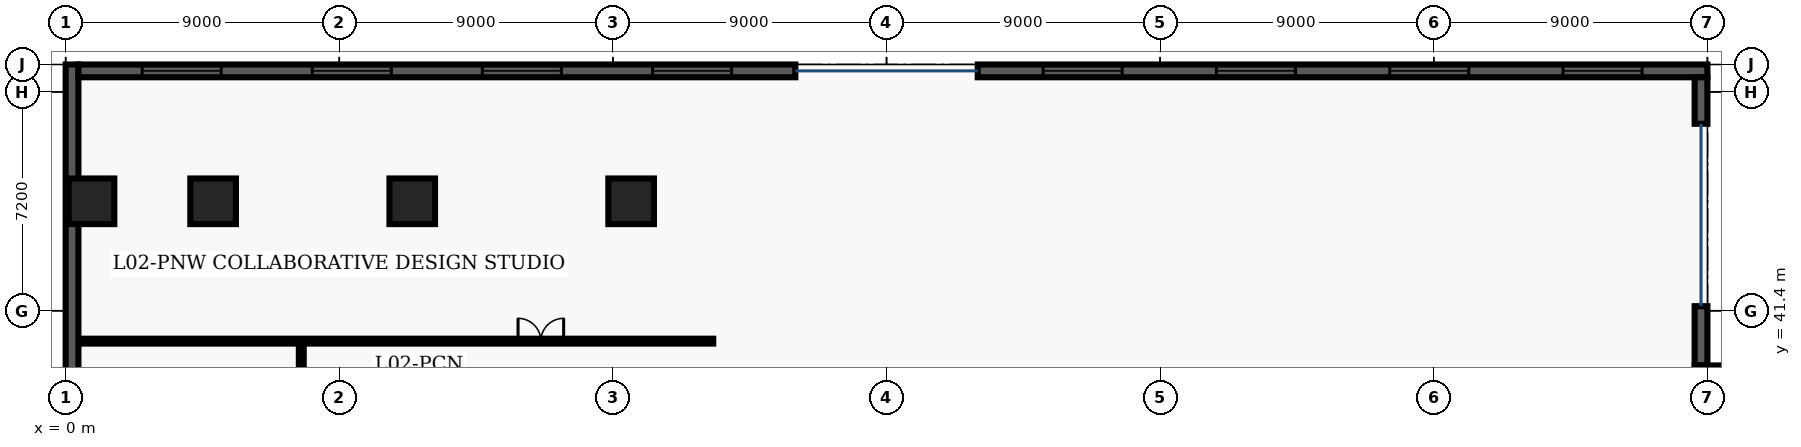
"""IFC4 building model, lengths in metres.
Left out: names, types, materials, properties, quantities, classifications, styles, units other than length and angle.
Written with IfcOpenShell. Run it as: python <this file> out.ifc"""

import sys

from ifc_helpers import new_model, entity, si_unit, converted_unit, direction, frame, origin_with_axes, origin_2d_with_axis, place, context, subcontext, project, spatial, polyline, rectangle, outline, extrude, element, fill, save


model = new_model("IFC4")
c1 = context("Model", 3, precision=1e-05, world=origin_with_axes(), true_north=direction((0.0, 1.0)))
c2 = subcontext(c1, "Body", "Model", "MODEL_VIEW")
j1 = project(units=[si_unit("LENGTHUNIT", "METRE"), converted_unit("PLANEANGLEUNIT", "DEGREE", entity("IfcPlaneAngleMeasure", 0.017), si_unit("PLANEANGLEUNIT", "RADIAN"), dimensions=[0, 0, 0, 0, 0, 0, 0])], contexts=[c1])
p1 = place(None, origin_with_axes())
s1 = spatial("IfcSite", under=j1, at=p1, CompositionType="ELEMENT")
p2 = place(p1, origin_with_axes())
s2 = spatial("IfcBuilding", under=s1, at=p2, CompositionType="ELEMENT")
p3 = place(p2, frame((0.0, 0.0, 10.8), z_axis=(0.0, 0.0, 1.0), x_axis=(1.0, 0.0, 0.0)))
s3 = spatial("IfcBuildingStorey", under=s2, at=p3, CompositionType="ELEMENT", Elevation=10.8)
for number, where, z_axis, x_axis in (
    (1, (11.4, 45.0, 0.0), (0.0, 0.0, 1.0), (1.0, 0.0, 0.0)),
    (2, (18.6, 45.0, 0.0), (0.0, 0.0, 1.0), (1.0, 0.0, 0.0)),
    (3, (4.85, 45.0, 0.0), (0.0, 0.0, 1.0), (1.0, 0.0, 0.0)),
    (4, (0.85, 45.0, 0.0), (0.0, 0.0, 1.0), (1.0, 0.0, 0.0)),
):
    element("IfcColumn", number, at=place(p3, frame(where, z_axis=z_axis, x_axis=x_axis)), inside=s3, PredefinedType="COLUMN", context=c2, shape_type="SweptSolid", body=[
        extrude(rectangle(XDim=1.5, YDim=1.5, at=origin_2d_with_axis()), origin_with_axes(), (0.0, 0.0, 1.0), 4.5),
    ])
p4 = place(p3, frame((0.38, 40.4, 0.0), z_axis=(0.0, 0.0, 1.0), x_axis=(1.0, 0.0, 0.0)))
e5 = element("IfcWall", 5, at=p4, inside=s3, PredefinedType="PARTITIONING", context=c2, shape_type="SweptSolid", body=[
    extrude(outline(polyline([(0.0, -0.08), (20.92, -0.08), (20.92, 0.08), (0.0, 0.08), (0.0, -0.08)])), origin_with_axes(), (0.0, 0.0, 1.0), 3.2),
])
p5 = place(p4, frame((15.25, 0.0, 0.0), z_axis=(0.0, 0.0, 1.0), x_axis=(1.0, 0.0, 0.0)))
e6 = element("IfcOpeningElement", 6, at=p5, cuts=e5, PredefinedType="OPENING", context=c2, shape_type="SweptSolid", body=[
    extrude(rectangle(XDim=1.5, YDim=0.18, at=origin_2d_with_axis()), origin_with_axes(), (0.0, 0.0, 1.0), 2.2),
])
p6 = place(p3, frame((7.75, 7.8, 0.0), z_axis=(0.0, 0.0, 1.0), x_axis=(0.0, 1.0, 0.0)))
e7 = element("IfcWall", 7, at=p6, inside=s3, PredefinedType="PARTITIONING", context=c2, shape_type="SweptSolid", body=[
    extrude(outline(polyline([(0.0, -0.08), (32.6, -0.08), (32.6, 0.08), (0.0, 0.08), (0.0, -0.08)])), origin_with_axes(), (0.0, 0.0, 1.0), 3.2),
])
p7 = place(p6, frame((8.25, 0.0, 0.0), z_axis=(0.0, 0.0, 1.0), x_axis=(1.0, 0.0, 0.0)))
e8 = element("IfcOpeningElement", 8, at=p7, cuts=e7, PredefinedType="OPENING", context=c2, shape_type="SweptSolid", body=[
    extrude(rectangle(XDim=1.5, YDim=0.18, at=origin_2d_with_axis()), origin_with_axes(), (0.0, 0.0, 1.0), 2.2),
])
p8 = place(p6, frame((21.5, 0.0, 0.0), z_axis=(0.0, 0.0, 1.0), x_axis=(1.0, 0.0, 0.0)))
e9 = element("IfcOpeningElement", 9, at=p8, cuts=e7, PredefinedType="OPENING", context=c2, shape_type="SweptSolid", body=[
    extrude(rectangle(XDim=1.0, YDim=0.18, at=origin_2d_with_axis()), origin_with_axes(), (0.0, 0.0, 1.0), 2.15),
])
p9 = place(p3, frame((0.21, 0.42, 0.0), z_axis=(0.0, 0.0, 1.0), x_axis=(0.0, 1.0, 0.0)))
e10 = element("IfcWall", 10, at=p9, inside=s3, PredefinedType="SOLIDWALL", context=c2, shape_type="SweptSolid", body=[
    extrude(outline(polyline([(0.0, -0.21), (49.08, -0.21), (49.08, 0.21), (0.0, 0.21), (0.0, -0.21)])), origin_with_axes(), (0.0, 0.0, 1.0), 4.26),
])
p10 = place(p9, frame((13.9, 0.0, 0.45), z_axis=(0.0, 0.0, 1.0), x_axis=(1.0, 0.0, 0.0)))
e11 = element("IfcOpeningElement", 11, at=p10, cuts=e10, PredefinedType="OPENING", context=c2, shape_type="SweptSolid", body=[
    extrude(rectangle(XDim=2.6, YDim=0.44, at=origin_2d_with_axis()), origin_with_axes(), (0.0, 0.0, 1.0), 2.8),
])
p11 = place(p9, frame((20.07, 0.0, 0.45), z_axis=(0.0, 0.0, 1.0), x_axis=(1.0, 0.0, 0.0)))
e12 = element("IfcOpeningElement", 12, at=p11, cuts=e10, PredefinedType="OPENING", context=c2, shape_type="SweptSolid", body=[
    extrude(rectangle(XDim=2.6, YDim=0.44, at=origin_2d_with_axis()), origin_with_axes(), (0.0, 0.0, 1.0), 2.8),
])
p12 = place(p9, frame((24.54, 0.0, 0.45), z_axis=(0.0, 0.0, 1.0), x_axis=(1.0, 0.0, 0.0)))
e13 = element("IfcOpeningElement", 13, at=p12, cuts=e10, PredefinedType="OPENING", context=c2, shape_type="SweptSolid", body=[
    extrude(rectangle(XDim=2.6, YDim=0.44, at=origin_2d_with_axis()), origin_with_axes(), (0.0, 0.0, 1.0), 2.8),
])
p13 = place(p9, frame((34.73, 0.0, 0.45), z_axis=(0.0, 0.0, 1.0), x_axis=(1.0, 0.0, 0.0)))
e14 = element("IfcOpeningElement", 14, at=p13, cuts=e10, PredefinedType="OPENING", context=c2, shape_type="SweptSolid", body=[
    extrude(rectangle(XDim=2.6, YDim=0.44, at=origin_2d_with_axis()), origin_with_axes(), (0.0, 0.0, 1.0), 2.8),
])
p14 = place(p3, frame((0.42, 49.29, 0.0), z_axis=(0.0, 0.0, 1.0), x_axis=(1.0, 0.0, 0.0)))
e15 = element("IfcWall", 15, at=p14, inside=s3, PredefinedType="SOLIDWALL", context=c2, shape_type="SweptSolid", body=[
    extrude(outline(polyline([(0.0, -0.21), (23.58, -0.21), (23.58, 0.21), (0.0, 0.21), (0.0, -0.21)])), origin_with_axes(), (0.0, 0.0, 1.0), 4.26),
])
p15 = place(p14, frame((3.398, 0.0, 0.45), z_axis=(0.0, 0.0, 1.0), x_axis=(1.0, 0.0, 0.0)))
e16 = element("IfcOpeningElement", 16, at=p15, cuts=e15, PredefinedType="OPENING", context=c2, shape_type="SweptSolid", body=[
    extrude(rectangle(XDim=2.6, YDim=0.44, at=origin_2d_with_axis()), origin_with_axes(), (0.0, 0.0, 1.0), 2.8),
])
p16 = place(p14, frame((8.992, 0.0, 0.45), z_axis=(0.0, 0.0, 1.0), x_axis=(1.0, 0.0, 0.0)))
e17 = element("IfcOpeningElement", 17, at=p16, cuts=e15, PredefinedType="OPENING", context=c2, shape_type="SweptSolid", body=[
    extrude(rectangle(XDim=2.6, YDim=0.44, at=origin_2d_with_axis()), origin_with_axes(), (0.0, 0.0, 1.0), 2.8),
])
p17 = place(p14, frame((14.587, 0.0, 0.45), z_axis=(0.0, 0.0, 1.0), x_axis=(1.0, 0.0, 0.0)))
e18 = element("IfcOpeningElement", 18, at=p17, cuts=e15, PredefinedType="OPENING", context=c2, shape_type="SweptSolid", body=[
    extrude(rectangle(XDim=2.6, YDim=0.44, at=origin_2d_with_axis()), origin_with_axes(), (0.0, 0.0, 1.0), 2.8),
])
p18 = place(p14, frame((20.183, 0.0, 0.45), z_axis=(0.0, 0.0, 1.0), x_axis=(1.0, 0.0, 0.0)))
e19 = element("IfcOpeningElement", 19, at=p18, cuts=e15, PredefinedType="OPENING", context=c2, shape_type="SweptSolid", body=[
    extrude(rectangle(XDim=2.6, YDim=0.44, at=origin_2d_with_axis()), origin_with_axes(), (0.0, 0.0, 1.0), 2.8),
])
p19 = place(p3, frame((30.0, 49.29, 0.0), z_axis=(0.0, 0.0, 1.0), x_axis=(1.0, 0.0, 0.0)))
e20 = element("IfcWall", 20, at=p19, inside=s3, PredefinedType="SOLIDWALL", context=c2, shape_type="SweptSolid", body=[
    extrude(outline(polyline([(0.0, -0.21), (24.0, -0.21), (24.0, 0.21), (0.0, 0.21), (0.0, -0.21)])), origin_with_axes(), (0.0, 0.0, 1.0), 4.26),
])
p20 = place(p19, frame((3.45, 0.0, 0.45), z_axis=(0.0, 0.0, 1.0), x_axis=(1.0, 0.0, 0.0)))
e21 = element("IfcOpeningElement", 21, at=p20, cuts=e20, PredefinedType="OPENING", context=c2, shape_type="SweptSolid", body=[
    extrude(rectangle(XDim=2.6, YDim=0.44, at=origin_2d_with_axis()), origin_with_axes(), (0.0, 0.0, 1.0), 2.8),
])
p21 = place(p19, frame((9.15, 0.0, 0.45), z_axis=(0.0, 0.0, 1.0), x_axis=(1.0, 0.0, 0.0)))
e22 = element("IfcOpeningElement", 22, at=p21, cuts=e20, PredefinedType="OPENING", context=c2, shape_type="SweptSolid", body=[
    extrude(rectangle(XDim=2.6, YDim=0.44, at=origin_2d_with_axis()), origin_with_axes(), (0.0, 0.0, 1.0), 2.8),
])
p22 = place(p19, frame((14.85, 0.0, 0.45), z_axis=(0.0, 0.0, 1.0), x_axis=(1.0, 0.0, 0.0)))
e23 = element("IfcOpeningElement", 23, at=p22, cuts=e20, PredefinedType="OPENING", context=c2, shape_type="SweptSolid", body=[
    extrude(rectangle(XDim=2.6, YDim=0.44, at=origin_2d_with_axis()), origin_with_axes(), (0.0, 0.0, 1.0), 2.8),
])
p23 = place(p19, frame((20.55, 0.0, 0.45), z_axis=(0.0, 0.0, 1.0), x_axis=(1.0, 0.0, 0.0)))
e24 = element("IfcOpeningElement", 24, at=p23, cuts=e20, PredefinedType="OPENING", context=c2, shape_type="SweptSolid", body=[
    extrude(rectangle(XDim=2.6, YDim=0.44, at=origin_2d_with_axis()), origin_with_axes(), (0.0, 0.0, 1.0), 2.8),
])
p24 = place(p3, frame((53.79, 49.08, 0.0), z_axis=(0.0, 0.0, 1.0), x_axis=(0.0, -1.0, 0.0)))
e25 = element("IfcWall", 25, at=p24, inside=s3, PredefinedType="SOLIDWALL", context=c2, shape_type="SweptSolid", body=[
    extrude(outline(polyline([(0.0, -0.21), (1.53, -0.21), (1.53, 0.21), (0.0, 0.21), (0.0, -0.21)])), origin_with_axes(), (0.0, 0.0, 1.0), 4.26),
])
p25 = place(p3, frame((53.79, 41.55, 0.0), z_axis=(0.0, 0.0, 1.0), x_axis=(0.0, -1.0, 0.0)))
e26 = element("IfcWall", 26, at=p25, inside=s3, PredefinedType="SOLIDWALL", context=c2, shape_type="SweptSolid", body=[
    extrude(outline(polyline([(0.0, -0.21), (1.95, -0.21), (1.95, 0.21), (0.0, 0.21), (0.0, -0.21)])), origin_with_axes(), (0.0, 0.0, 1.0), 4.26),
])
p26 = place(p3, frame((53.58, 39.39, 0.0), z_axis=(0.0, 0.0, 1.0), x_axis=(1.0, 0.0, 0.0)))
e27 = element("IfcWall", 27, at=p26, inside=s3, PredefinedType="SOLIDWALL", context=c2, shape_type="SweptSolid", body=[
    extrude(outline(polyline([(0.0, -0.21), (4.62, -0.21), (4.62, 0.21), (0.0, 0.21), (0.0, -0.21)])), origin_with_axes(), (0.0, 0.0, 1.0), 4.26),
])
p27 = place(p26, frame((2.31, 0.0, 0.45), z_axis=(0.0, 0.0, 1.0), x_axis=(1.0, 0.0, 0.0)))
e28 = element("IfcOpeningElement", 28, at=p27, cuts=e27, PredefinedType="OPENING", context=c2, shape_type="SweptSolid", body=[
    extrude(rectangle(XDim=2.6, YDim=0.44, at=origin_2d_with_axis()), origin_with_axes(), (0.0, 0.0, 1.0), 2.8),
])
p28 = place(p4, frame((15.25, 0.0, 0.0), z_axis=(0.0, 0.0, 1.0), x_axis=(1.0, 0.0, 0.0)))
e29 = element("IfcDoor", 29, at=p28, inside=s3, OperationType="DOUBLE_DOOR_SINGLE_SWING", PredefinedType="DOOR", context=c2, shape_type="SweptSolid", body=[
    extrude(rectangle(XDim=1.5, YDim=0.09, at=origin_2d_with_axis()), origin_with_axes(), (0.0, 0.0, 1.0), 2.2),
])
fill(e6, e29)
p29 = place(p14, frame((3.398, 0.0, 0.45), z_axis=(0.0, 0.0, 1.0), x_axis=(1.0, 0.0, 0.0)))
e30 = element("IfcWindow", 30, at=p29, inside=s3, PredefinedType="WINDOW", context=c2, shape_type="SweptSolid", body=[
    extrude(rectangle(XDim=2.6, YDim=0.09, at=origin_2d_with_axis()), origin_with_axes(), (0.0, 0.0, 1.0), 2.8),
])
fill(e16, e30)
p30 = place(p14, frame((8.992, 0.0, 0.45), z_axis=(0.0, 0.0, 1.0), x_axis=(1.0, 0.0, 0.0)))
e31 = element("IfcWindow", 31, at=p30, inside=s3, PredefinedType="WINDOW", context=c2, shape_type="SweptSolid", body=[
    extrude(rectangle(XDim=2.6, YDim=0.09, at=origin_2d_with_axis()), origin_with_axes(), (0.0, 0.0, 1.0), 2.8),
])
fill(e17, e31)
p31 = place(p14, frame((14.587, 0.0, 0.45), z_axis=(0.0, 0.0, 1.0), x_axis=(1.0, 0.0, 0.0)))
e32 = element("IfcWindow", 32, at=p31, inside=s3, PredefinedType="WINDOW", context=c2, shape_type="SweptSolid", body=[
    extrude(rectangle(XDim=2.6, YDim=0.09, at=origin_2d_with_axis()), origin_with_axes(), (0.0, 0.0, 1.0), 2.8),
])
fill(e18, e32)
p32 = place(p14, frame((20.183, 0.0, 0.45), z_axis=(0.0, 0.0, 1.0), x_axis=(1.0, 0.0, 0.0)))
e33 = element("IfcWindow", 33, at=p32, inside=s3, PredefinedType="WINDOW", context=c2, shape_type="SweptSolid", body=[
    extrude(rectangle(XDim=2.6, YDim=0.09, at=origin_2d_with_axis()), origin_with_axes(), (0.0, 0.0, 1.0), 2.8),
])
fill(e19, e33)
p33 = place(p19, frame((3.45, 0.0, 0.45), z_axis=(0.0, 0.0, 1.0), x_axis=(1.0, 0.0, 0.0)))
e34 = element("IfcWindow", 34, at=p33, inside=s3, PredefinedType="WINDOW", context=c2, shape_type="SweptSolid", body=[
    extrude(rectangle(XDim=2.6, YDim=0.09, at=origin_2d_with_axis()), origin_with_axes(), (0.0, 0.0, 1.0), 2.8),
])
fill(e21, e34)
p34 = place(p19, frame((9.15, 0.0, 0.45), z_axis=(0.0, 0.0, 1.0), x_axis=(1.0, 0.0, 0.0)))
e35 = element("IfcWindow", 35, at=p34, inside=s3, PredefinedType="WINDOW", context=c2, shape_type="SweptSolid", body=[
    extrude(rectangle(XDim=2.6, YDim=0.09, at=origin_2d_with_axis()), origin_with_axes(), (0.0, 0.0, 1.0), 2.8),
])
fill(e22, e35)
p35 = place(p19, frame((14.85, 0.0, 0.45), z_axis=(0.0, 0.0, 1.0), x_axis=(1.0, 0.0, 0.0)))
e36 = element("IfcWindow", 36, at=p35, inside=s3, PredefinedType="WINDOW", context=c2, shape_type="SweptSolid", body=[
    extrude(rectangle(XDim=2.6, YDim=0.09, at=origin_2d_with_axis()), origin_with_axes(), (0.0, 0.0, 1.0), 2.8),
])
fill(e23, e36)
p36 = place(p19, frame((20.55, 0.0, 0.45), z_axis=(0.0, 0.0, 1.0), x_axis=(1.0, 0.0, 0.0)))
e37 = element("IfcWindow", 37, at=p36, inside=s3, PredefinedType="WINDOW", context=c2, shape_type="SweptSolid", body=[
    extrude(rectangle(XDim=2.6, YDim=0.09, at=origin_2d_with_axis()), origin_with_axes(), (0.0, 0.0, 1.0), 2.8),
])
fill(e24, e37)
save(model, sys.argv[1])
